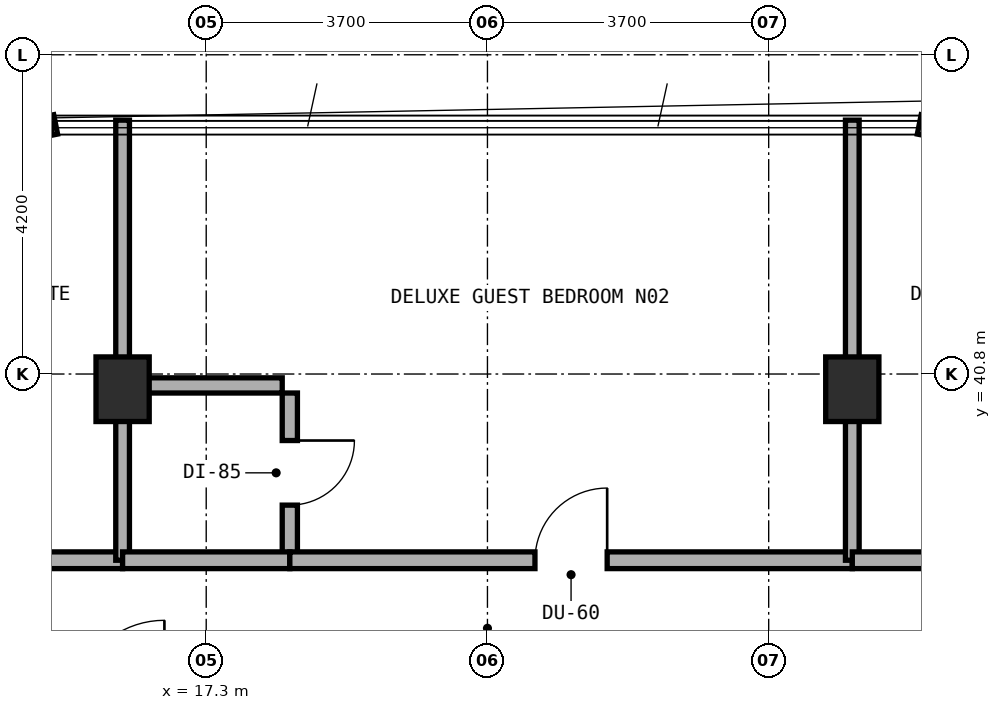
"""IFC4 building model, lengths in metres.
Left out: names, types, materials, properties, quantities, classifications, styles, units other than length and angle.
Written with IfcOpenShell. Run it as: python <this file> out.ifc"""

import sys

from ifc_helpers import new_model, si_unit, direction, frame, frame_2d, origin, origin_2d, place, context, subcontext, project, spatial, rectangle, extrude, element, fill, save


model = new_model("IFC4")
c1 = context("Model", 3, precision=1e-05, world=origin(), true_north=direction((0.0, 1.0)))
c2 = subcontext(c1, "Body", "Model", "MODEL_VIEW")
j1 = project(units=[si_unit("LENGTHUNIT", "METRE"), si_unit("PLANEANGLEUNIT", "RADIAN")], contexts=[c1])
p1 = place(None, origin())
s1 = spatial("IfcSite", under=j1, at=p1, CompositionType="ELEMENT")
p2 = place(p1, origin())
s2 = spatial("IfcBuilding", under=s1, at=p2, CompositionType="ELEMENT")
p3 = place(p2, frame((0.0, 0.0, 217.1)))
s3 = spatial("IfcBuildingStorey", under=s2, at=p3, CompositionType="ELEMENT", Elevation=217.1)
for number, where, z_axis, x_axis in (
    (1, (16.2, 40.6, 0.0), (0.0, 0.0, 1.0), (1.0, 0.0, 0.0)),
    (2, (25.8, 40.6, 0.0), (0.0, 0.0, 1.0), (1.0, 0.0, 0.0)),
):
    element("IfcColumn", number, at=place(p3, frame(where, z_axis=z_axis, x_axis=x_axis)), inside=s3, PredefinedType="COLUMN", context=c2, shape_type="SweptSolid", body=[
        extrude(rectangle(XDim=0.7, YDim=0.85, at=origin_2d()), origin(), (0.0, 0.0, 1.0), 3.6),
    ])
p4 = place(p3, frame((35.283, 42.371, 0.0), z_axis=(0.0, 0.0, 1.0), x_axis=(-0.980745199176, 0.195291715883, 0.0)))
e3 = element("IfcWall", 3, at=p4, inside=s3, PredefinedType="STANDARD", context=c2, shape_type="SweptSolid", body=[
    extrude(rectangle(XDim=8.771, YDim=0.26, at=frame_2d((4.385, 0.0))), origin(), (0.0, 0.0, 1.0), 3.32),
])
p5 = place(p4, frame((3.335, 0.0, 0.85)))
e4 = element("IfcOpeningElement", 4, at=p5, cuts=e3, PredefinedType="OPENING", context=c2, shape_type="SweptSolid", body=[
    extrude(rectangle(XDim=2.1, YDim=1.5, at=frame_2d((1.05, 0.75))), frame((0.0, 0.14, 0.0), z_axis=(0.0, -1.0, 0.0), x_axis=(1.0, 0.0, 0.0)), (0.0, 0.0, 1.0), 0.28),
])
p6 = place(p3, frame((15.319, 44.084, 0.0), z_axis=(0.0, 0.0, 1.0), x_axis=(-0.980745199176, -0.195291715883, 0.0)))
e5 = element("IfcWall", 5, at=p6, inside=s3, PredefinedType="STANDARD", context=c2, shape_type="SweptSolid", body=[
    extrude(rectangle(XDim=8.771, YDim=0.26, at=frame_2d((4.385, 0.0))), origin(), (0.0, 0.0, 1.0), 3.32),
])
p7 = place(p6, frame((3.335, 0.0, 0.85)))
e6 = element("IfcOpeningElement", 6, at=p7, cuts=e5, PredefinedType="OPENING", context=c2, shape_type="SweptSolid", body=[
    extrude(rectangle(XDim=2.1, YDim=1.5, at=frame_2d((1.05, 0.75))), frame((0.0, 0.14, 0.0), z_axis=(0.0, -1.0, 0.0), x_axis=(1.0, 0.0, 0.0)), (0.0, 0.0, 1.0), 0.28),
])
p8 = place(p3, frame((11.15, 38.35, 0.0), z_axis=(0.0, 0.0, 1.0), x_axis=(1.0, 0.0, 0.0)))
e7 = element("IfcWall", 7, at=p8, inside=s3, PredefinedType="SOLIDWALL", context=c2, shape_type="SweptSolid", body=[
    extrude(rectangle(XDim=5.05, YDim=0.22, at=frame_2d((2.525, 0.0))), origin(), (0.0, 0.0, 1.0), 2.695),
])
p9 = place(p8, frame((2.05, 0.0, 0.0)))
e8 = element("IfcOpeningElement", 8, at=p9, cuts=e7, PredefinedType="OPENING", context=c2, shape_type="SweptSolid", body=[
    extrude(rectangle(XDim=0.95, YDim=2.1, at=frame_2d((0.475, 1.05))), frame((0.0, 0.12, 0.0), z_axis=(0.0, -1.0, 0.0), x_axis=(1.0, 0.0, 0.0)), (0.0, 0.0, 1.0), 0.24),
])
p10 = place(p3, frame((16.2, 38.35, 0.0), z_axis=(0.0, 0.0, 1.0), x_axis=(0.0, 1.0, 0.0)))
e9 = element("IfcWall", 9, at=p10, inside=s3, PredefinedType="SOLIDWALL", context=c2, shape_type="SweptSolid", body=[
    extrude(rectangle(XDim=5.79, YDim=0.18, at=frame_2d((2.895, 0.0))), origin(), (0.0, 0.0, 1.0), 2.695),
])
p11 = place(p3, frame((18.4, 38.45, 0.0), z_axis=(0.0, 0.0, 1.0), x_axis=(0.0, 1.0, 0.0)))
e10 = element("IfcWall", 10, at=p11, inside=s3, PredefinedType="PLUMBINGWALL", context=c2, shape_type="SweptSolid", body=[
    extrude(rectangle(XDim=2.1, YDim=0.2, at=frame_2d((1.05, 0.0))), origin(), (0.0, 0.0, 1.0), 2.995),
])
p12 = place(p11, frame((0.625, 0.0, 0.0)))
e11 = element("IfcOpeningElement", 11, at=p12, cuts=e10, PredefinedType="OPENING", context=c2, shape_type="SweptSolid", body=[
    extrude(rectangle(XDim=0.85, YDim=2.1, at=frame_2d((0.425, 1.05))), frame((0.0, 0.11, 0.0), z_axis=(0.0, -1.0, 0.0), x_axis=(1.0, 0.0, 0.0)), (0.0, 0.0, 1.0), 0.22),
])
p13 = place(p3, frame((16.3, 40.65, 0.0), z_axis=(0.0, 0.0, 1.0), x_axis=(1.0, 0.0, 0.0)))
e12 = element("IfcWall", 12, at=p13, inside=s3, PredefinedType="PLUMBINGWALL", context=c2, shape_type="SweptSolid", body=[
    extrude(rectangle(XDim=2.0, YDim=0.2, at=frame_2d((1.0, 0.0))), origin(), (0.0, 0.0, 1.0), 3.015),
])
p14 = place(p3, frame((16.2, 38.35, 0.0), z_axis=(0.0, 0.0, 1.0), x_axis=(1.0, 0.0, 0.0)))
e13 = element("IfcWall", 13, at=p14, inside=s3, PredefinedType="SOLIDWALL", context=c2, shape_type="SweptSolid", body=[
    extrude(rectangle(XDim=2.2, YDim=0.22, at=frame_2d((1.1, 0.0))), origin(), (0.0, 0.0, 1.0), 2.695),
])
p15 = place(p3, frame((18.4, 38.35, 0.0), z_axis=(0.0, 0.0, 1.0), x_axis=(1.0, 0.0, 0.0)))
e14 = element("IfcWall", 14, at=p15, inside=s3, PredefinedType="SOLIDWALL", context=c2, shape_type="SweptSolid", body=[
    extrude(rectangle(XDim=7.4, YDim=0.22, at=frame_2d((3.7, 0.0))), origin(), (0.0, 0.0, 1.0), 2.695),
])
p16 = place(p15, frame((3.225, 0.0, 0.0)))
e15 = element("IfcOpeningElement", 15, at=p16, cuts=e14, PredefinedType="OPENING", context=c2, shape_type="SweptSolid", body=[
    extrude(rectangle(XDim=0.95, YDim=2.1, at=frame_2d((0.475, 1.05))), frame((0.0, 0.12, 0.0), z_axis=(0.0, -1.0, 0.0), x_axis=(1.0, 0.0, 0.0)), (0.0, 0.0, 1.0), 0.24),
])
p17 = place(p3, frame((25.8, 38.35, 0.0), z_axis=(0.0, 0.0, 1.0), x_axis=(0.0, 1.0, 0.0)))
e16 = element("IfcWall", 16, at=p17, inside=s3, PredefinedType="SOLIDWALL", context=c2, shape_type="SweptSolid", body=[
    extrude(rectangle(XDim=5.79, YDim=0.18, at=frame_2d((2.895, 0.0))), origin(), (0.0, 0.0, 1.0), 2.695),
])
p18 = place(p3, frame((25.8, 38.35, 0.0), z_axis=(0.0, 0.0, 1.0), x_axis=(1.0, 0.0, 0.0)))
e17 = element("IfcWall", 17, at=p18, inside=s3, PredefinedType="SOLIDWALL", context=c2, shape_type="SweptSolid", body=[
    extrude(rectangle(XDim=5.05, YDim=0.22, at=frame_2d((2.525, 0.0))), origin(), (0.0, 0.0, 1.0), 2.695),
])
p19 = place(p18, frame((2.05, 0.0, 0.0)))
e18 = element("IfcOpeningElement", 18, at=p19, cuts=e17, PredefinedType="OPENING", context=c2, shape_type="SweptSolid", body=[
    extrude(rectangle(XDim=0.95, YDim=2.1, at=frame_2d((0.475, 1.05))), frame((0.0, 0.12, 0.0), z_axis=(0.0, -1.0, 0.0), x_axis=(1.0, 0.0, 0.0)), (0.0, 0.0, 1.0), 0.24),
])
p20 = place(p12, frame((0.85, 0.0, 0.0), z_axis=(0.0, 0.0, 1.0), x_axis=(-1.0, 0.0, 0.0)))
e19 = element("IfcDoor", 19, at=p20, inside=s3, OperationType="SINGLE_SWING_LEFT", PredefinedType="DOOR", context=c2, shape_type="SweptSolid", body=[
    extrude(rectangle(XDim=0.85, YDim=2.1, at=frame_2d((0.425, 1.05))), frame((0.0, 0.025, 0.0), z_axis=(0.0, -1.0, 0.0), x_axis=(1.0, 0.0, 0.0)), (0.0, 0.0, 1.0), 0.05),
])
fill(e11, e19)
p21 = place(p16, origin())
e20 = element("IfcDoor", 20, at=p21, inside=s3, OperationType="SINGLE_SWING_RIGHT", PredefinedType="DOOR", context=c2, shape_type="SweptSolid", body=[
    extrude(rectangle(XDim=0.95, YDim=2.1, at=frame_2d((0.475, 1.05))), frame((0.0, 0.025, 0.0), z_axis=(0.0, -1.0, 0.0), x_axis=(1.0, 0.0, 0.0)), (0.0, 0.0, 1.0), 0.05),
])
fill(e15, e20)
save(model, sys.argv[1])
